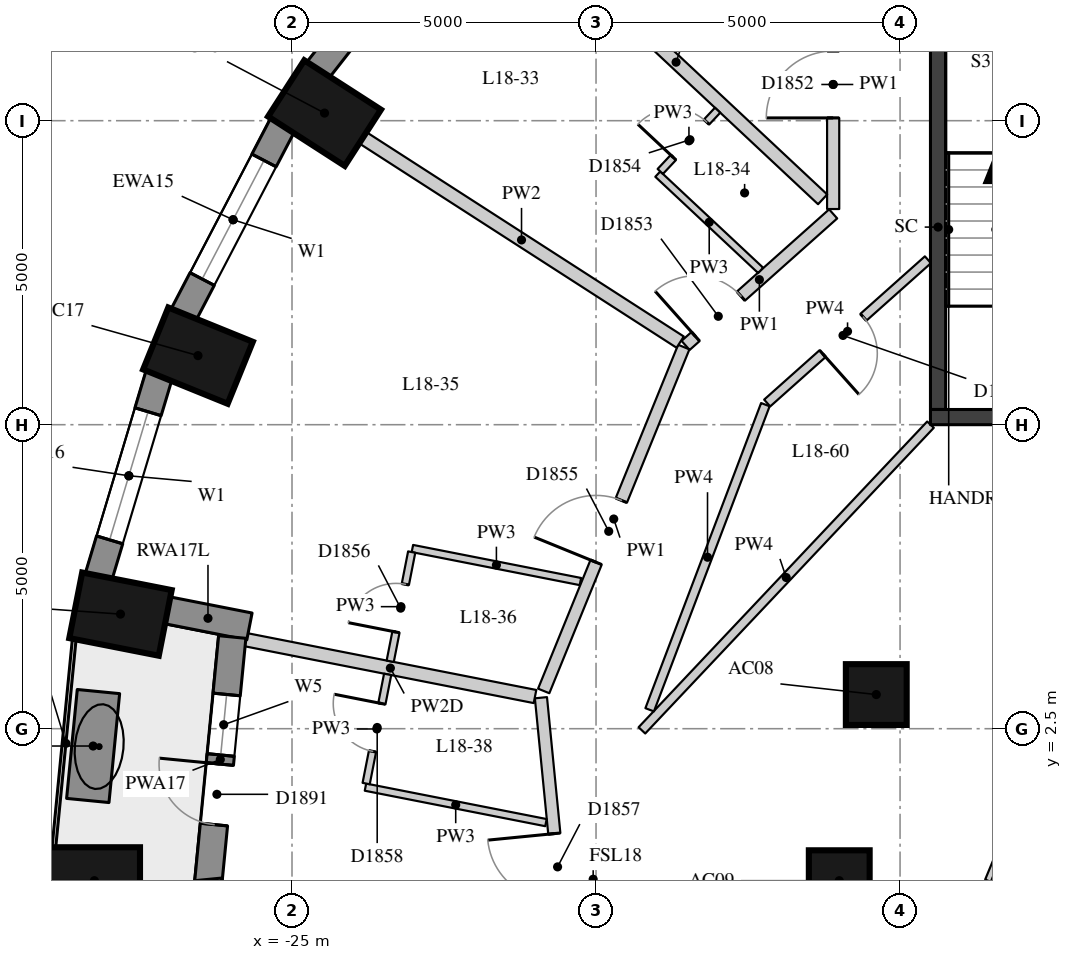
"""IFC4 building model, lengths in metres.
Left out: names, types, materials, properties, quantities, classifications, styles, units other than length and angle.
Written with IfcOpenShell. Run it as: python <this file> out.ifc"""

import sys

from ifc_helpers import new_model, si_unit, direction, frame, frame_2d, origin, origin_2d, place, context, subcontext, project, spatial, rectangle, extrude, element, fill, save


model = new_model("IFC4")
c1 = context("Model", 3, precision=1e-05, world=origin(), true_north=direction((0.0, 1.0)))
c2 = subcontext(c1, "Body", "Model", "MODEL_VIEW")
j1 = project(units=[si_unit("LENGTHUNIT", "METRE"), si_unit("PLANEANGLEUNIT", "RADIAN")], contexts=[c1])
p1 = place(None, origin())
s1 = spatial("IfcSite", under=j1, at=p1, CompositionType="ELEMENT")
p2 = place(p1, origin())
s2 = spatial("IfcBuilding", under=s1, at=p2, CompositionType="ELEMENT")
p3 = place(p2, frame((0.0, 0.0, 67.9)))
s3 = spatial("IfcBuildingStorey", under=s2, at=p3, CompositionType="ELEMENT", Elevation=67.9)
for number, where, z_axis, x_axis in (
    (1, (-24.465, 12.625, 0.0), (0.0, 0.0, 1.0), (-0.841, 0.541, 0.0)),
    (2, (-26.546, 8.636, 0.0), (0.0, 0.0, 1.0), (-0.927, 0.376, 0.0)),
    (3, (-27.821, 4.385, 0.0), (0.0, 0.0, 1.0), (-0.981, 0.193, 0.0)),
    (4, (-28.25, 0.0, 0.0), (0.0, 0.0, 1.0), (-1.0, 0.0, 0.0)),
):
    element("IfcColumn", number, at=place(p3, frame(where, z_axis=z_axis, x_axis=x_axis)), inside=s3, PredefinedType="COLUMN", context=c2, shape_type="SweptSolid", body=[
        extrude(rectangle(XDim=1.5, YDim=1.1, at=origin_2d()), origin(), (0.0, 0.0, 1.0), 3.3),
    ])
for number, where, z_axis, x_axis in (
    (5, (-15.391, 3.062, 0.0), (0.0, 0.0, 1.0), (1.0, 0.0, 0.0)),
    (6, (-16.0, 0.0, 0.0), (0.0, 0.0, 1.0), (1.0, 0.0, 0.0)),
):
    element("IfcColumn", number, at=place(p3, frame(where, z_axis=z_axis, x_axis=x_axis)), inside=s3, PredefinedType="COLUMN", context=c2, shape_type="SweptSolid", body=[
        extrude(rectangle(XDim=1.0, YDim=1.0, at=origin_2d()), origin(), (0.0, 0.0, 1.0), 3.3),
    ])
p4 = place(p3, frame((-22.352, 16.17, 0.0), z_axis=(0.0, 0.0, 1.0), x_axis=(-0.616661975264, -0.787228053529, 0.0)))
e7 = element("IfcWall", 7, at=p4, inside=s3, PredefinedType="SOLIDWALL", context=c2, shape_type="SweptSolid", body=[
    extrude(rectangle(XDim=3.61, YDim=0.45, at=frame_2d((1.805, 0.0))), origin(), (0.0, 0.0, 1.0), 3.02),
])
p5 = place(p4, frame((0.705, 0.0, 0.4)))
e8 = element("IfcOpeningElement", 8, at=p5, cuts=e7, PredefinedType="OPENING", context=c2, shape_type="SweptSolid", body=[
    extrude(rectangle(XDim=2.2, YDim=1.75, at=frame_2d((1.1, 0.875))), frame((0.0, 0.235, 0.0), z_axis=(0.0, -1.0, 0.0), x_axis=(1.0, 0.0, 0.0)), (0.0, 0.0, 1.0), 0.47),
])
p6 = place(p3, frame((-25.152, 12.437, 0.0), z_axis=(0.0, 0.0, 1.0), x_axis=(-0.462492775226, -0.886623050041, 0.0)))
e9 = element("IfcWall", 9, at=p6, inside=s3, PredefinedType="SOLIDWALL", context=c2, shape_type="SweptSolid", body=[
    extrude(rectangle(XDim=3.532, YDim=0.45, at=frame_2d((1.766, 0.0))), origin(), (0.0, 0.0, 1.0), 3.02),
])
p7 = place(p6, frame((0.666, 0.0, 0.4)))
e10 = element("IfcOpeningElement", 10, at=p7, cuts=e9, PredefinedType="OPENING", context=c2, shape_type="SweptSolid", body=[
    extrude(rectangle(XDim=2.2, YDim=1.75, at=frame_2d((1.1, 0.875))), frame((0.0, 0.235, 0.0), z_axis=(0.0, -1.0, 0.0), x_axis=(1.0, 0.0, 0.0)), (0.0, 0.0, 1.0), 0.47),
])
p8 = place(p3, frame((-27.185, 8.323, 0.0), z_axis=(0.0, 0.0, 1.0), x_axis=(-0.287064133733, -0.957911364963, 0.0)))
e11 = element("IfcWall", 11, at=p8, inside=s3, PredefinedType="SOLIDWALL", context=c2, shape_type="SweptSolid", body=[
    extrude(rectangle(XDim=3.473, YDim=0.45, at=frame_2d((1.737, 0.0))), origin(), (0.0, 0.0, 1.0), 3.02),
])
p9 = place(p8, frame((0.637, 0.0, 0.4)))
e12 = element("IfcOpeningElement", 12, at=p9, cuts=e11, PredefinedType="OPENING", context=c2, shape_type="SweptSolid", body=[
    extrude(rectangle(XDim=2.2, YDim=1.75, at=frame_2d((1.1, 0.875))), frame((0.0, 0.235, 0.0), z_axis=(0.0, -1.0, 0.0), x_axis=(1.0, 0.0, 0.0)), (0.0, 0.0, 1.0), 0.47),
])
p10 = place(p3, frame((-27.064, 4.45, 0.0), z_axis=(0.0, 0.0, 1.0), x_axis=(0.98123042829, -0.192838913596, 0.0)))
e13 = element("IfcWall", 13, at=p10, inside=s3, PredefinedType="SOLIDWALL", context=c2, shape_type="SweptSolid", body=[
    extrude(rectangle(XDim=1.39, YDim=0.45, at=frame_2d((0.695, 0.0))), origin(), (0.0, 0.0, 1.0), 2.47),
])
p11 = place(p3, frame((-25.983, 4.008, 0.0), z_axis=(0.0, 0.0, 1.0), x_axis=(-0.097133468736, -0.995271364629, 0.0)))
e14 = element("IfcWall", 14, at=p11, inside=s3, PredefinedType="SOLIDWALL", context=c2, shape_type="SweptSolid", body=[
    extrude(rectangle(XDim=4.049, YDim=0.45, at=frame_2d((2.024, 0.0))), origin(), (0.0, 0.0, 1.0), 3.02),
])
p12 = place(p11, frame((0.949, 0.0, 0.4)))
e15 = element("IfcOpeningElement", 15, at=p12, cuts=e14, PredefinedType="OPENING", context=c2, shape_type="SweptSolid", body=[
    extrude(rectangle(XDim=1.0, YDim=1.75, at=frame_2d((0.5, 0.875))), frame((0.0, 0.235, 0.0), z_axis=(0.0, -1.0, 0.0), x_axis=(1.0, 0.0, 0.0)), (0.0, 0.0, 1.0), 0.47),
])
p13 = place(p11, frame((2.1, 0.0, 0.0)))
e16 = element("IfcOpeningElement", 16, at=p13, cuts=e14, PredefinedType="OPENING", context=c2, shape_type="SweptSolid", body=[
    extrude(rectangle(XDim=1.0, YDim=2.15, at=frame_2d((0.5, 1.075))), frame((0.0, 0.235, 0.0), z_axis=(0.0, -1.0, 0.0), x_axis=(1.0, 0.0, 0.0)), (0.0, 0.0, 1.0), 0.47),
])
p14 = place(p3, frame((-26.376, 0.022, 0.0), z_axis=(0.0, 0.0, 1.0), x_axis=(0.097092719726, -0.995275340685, 0.0)))
e17 = element("IfcWall", 17, at=p14, inside=s3, PredefinedType="SOLIDWALL", context=c2, shape_type="SweptSolid", body=[
    extrude(rectangle(XDim=4.071, YDim=0.45, at=frame_2d((2.036, 0.0))), origin(), (0.0, 0.0, 1.0), 3.02),
])
p15 = place(p14, frame((0.96, 0.0, 0.4)))
e18 = element("IfcOpeningElement", 18, at=p15, cuts=e17, PredefinedType="OPENING", context=c2, shape_type="SweptSolid", body=[
    extrude(rectangle(XDim=1.0, YDim=1.75, at=frame_2d((0.5, 0.875))), frame((0.0, 0.235, 0.0), z_axis=(0.0, -1.0, 0.0), x_axis=(1.0, 0.0, 0.0)), (0.0, 0.0, 1.0), 0.47),
])
p16 = place(p14, frame((2.111, 0.0, 0.0)))
e19 = element("IfcOpeningElement", 19, at=p16, cuts=e17, PredefinedType="OPENING", context=c2, shape_type="SweptSolid", body=[
    extrude(rectangle(XDim=1.0, YDim=2.15, at=frame_2d((0.5, 1.075))), frame((0.0, 0.235, 0.0), z_axis=(0.0, -1.0, 0.0), x_axis=(1.0, 0.0, 0.0)), (0.0, 0.0, 1.0), 0.47),
])
p17 = place(p3, frame((-28.183, 3.111, 0.0), z_axis=(0.0, 0.0, 1.0), x_axis=(-0.097381768628, -0.995247100543, 0.0)))
e20 = element("IfcWall", 20, at=p17, inside=s3, PredefinedType="USERDEFINED", context=c2, shape_type="SweptSolid", body=[
    extrude(rectangle(XDim=1.8, YDim=0.7, at=frame_2d((0.9, 0.0))), origin(), (0.0, 0.0, 1.0), 0.75),
])
p18 = place(p3, frame((-14.375, 7.75, -0.28), z_axis=(0.0, 0.0, 1.0), x_axis=(0.0, 1.0, 0.0)))
e21 = element("IfcWall", 21, at=p18, inside=s3, PredefinedType="SHEAR", context=c2, shape_type="SweptSolid", body=[
    extrude(rectangle(XDim=6.0, YDim=0.25, at=frame_2d((3.0, 0.0))), origin(), (0.0, 0.0, 1.0), 3.3),
])
p19 = place(p3, frame((-14.5, 7.625, -0.28), z_axis=(0.0, 0.0, 1.0), x_axis=(1.0, 0.0, 0.0)))
e22 = element("IfcWall", 22, at=p19, inside=s3, PredefinedType="SHEAR", context=c2, shape_type="SweptSolid", body=[
    extrude(rectangle(XDim=5.2, YDim=0.25, at=frame_2d((2.6, 0.0))), origin(), (0.0, 0.0, 1.0), 3.3),
])
p20 = place(p3, frame((-20.034, -5.858, 0.0), z_axis=(0.0, 0.0, 1.0), x_axis=(-0.097894942705, 0.995196754513, 0.0)))
e23 = element("IfcWall", 23, at=p20, inside=s3, PredefinedType="PARTITIONING", context=c2, shape_type="SweptSolid", body=[
    extrude(rectangle(XDim=8.911, YDim=0.2, at=frame_2d((4.455, 0.0))), origin(), (0.0, 0.0, 1.0), 3.02),
])
p21 = place(p20, frame((5.565, 0.0, 0.0)))
e24 = element("IfcOpeningElement", 24, at=p21, cuts=e23, PredefinedType="OPENING", context=c2, shape_type="SweptSolid", body=[
    extrude(rectangle(XDim=1.1, YDim=2.1, at=frame_2d((0.55, 1.05))), frame((0.0, 0.11, 0.0), z_axis=(0.0, -1.0, 0.0), x_axis=(1.0, 0.0, 0.0)), (0.0, 0.0, 1.0), 0.22),
])
p22 = place(p20, frame((1.044, 0.0, 0.0)))
e25 = element("IfcOpeningElement", 25, at=p22, cuts=e23, PredefinedType="OPENING", context=c2, shape_type="SweptSolid", body=[
    extrude(rectangle(XDim=0.9, YDim=2.1, at=frame_2d((0.45, 1.05))), frame((0.0, 0.11, 0.0), z_axis=(0.0, -1.0, 0.0), x_axis=(1.0, 0.0, 0.0)), (0.0, 0.0, 1.0), 0.22),
])
p23 = place(p3, frame((-20.861, 3.121, 0.0), z_axis=(0.0, 0.0, 1.0), x_axis=(0.377214346955, 0.926125983034, 0.0)))
e26 = element("IfcWall", 26, at=p23, inside=s3, PredefinedType="PARTITIONING", context=c2, shape_type="SweptSolid", body=[
    extrude(rectangle(XDim=6.107, YDim=0.2, at=frame_2d((3.054, 0.0))), origin(), (0.0, 0.0, 1.0), 3.02),
])
p24 = place(p23, frame((2.285, 0.0, 0.0)))
e27 = element("IfcOpeningElement", 27, at=p24, cuts=e26, PredefinedType="OPENING", context=c2, shape_type="SweptSolid", body=[
    extrude(rectangle(XDim=1.1, YDim=2.1, at=frame_2d((0.55, 1.05))), frame((0.0, 0.11, 0.0), z_axis=(0.0, -1.0, 0.0), x_axis=(1.0, 0.0, 0.0)), (0.0, 0.0, 1.0), 0.22),
])
p25 = place(p3, frame((-18.527, 8.804, 0.0), z_axis=(0.0, 0.0, 1.0), x_axis=(0.746493000154, 0.665393267716, 0.0)))
e28 = element("IfcWall", 28, at=p25, inside=s3, PredefinedType="PARTITIONING", context=c2, shape_type="SweptSolid", body=[
    extrude(rectangle(XDim=3.251, YDim=0.2, at=frame_2d((1.625, 0.0))), origin(), (0.0, 0.0, 1.0), 3.02),
])
p26 = place(p25, frame((0.22, 0.0, 0.0)))
e29 = element("IfcOpeningElement", 29, at=p26, cuts=e28, PredefinedType="OPENING", context=c2, shape_type="SweptSolid", body=[
    extrude(rectangle(XDim=1.0, YDim=2.1, at=frame_2d((0.5, 1.05))), frame((0.0, 0.11, 0.0), z_axis=(0.0, -1.0, 0.0), x_axis=(1.0, 0.0, 0.0)), (0.0, 0.0, 1.0), 0.22),
])
p27 = place(p3, frame((-16.1, 11.047, 0.0), z_axis=(0.0, 0.0, 1.0), x_axis=(0.0, 1.0, 0.0)))
e30 = element("IfcWall", 30, at=p27, inside=s3, PredefinedType="PARTITIONING", context=c2, shape_type="SweptSolid", body=[
    extrude(rectangle(XDim=4.097, YDim=0.2, at=frame_2d((2.048, 0.0))), origin(), (0.0, 0.0, 1.0), 3.02),
])
p28 = place(p27, frame((1.499, 0.0, 0.0)))
e31 = element("IfcOpeningElement", 31, at=p28, cuts=e30, PredefinedType="OPENING", context=c2, shape_type="SweptSolid", body=[
    extrude(rectangle(XDim=1.1, YDim=2.1, at=frame_2d((0.55, 1.05))), frame((0.0, 0.11, 0.0), z_axis=(0.0, -1.0, 0.0), x_axis=(1.0, 0.0, 0.0)), (0.0, 0.0, 1.0), 0.22),
])
p29 = place(p3, frame((-14.499, 7.501, 0.0), z_axis=(0.0, 0.0, 1.0), x_axis=(-0.686403699782, -0.727220709913, 0.0)))
e32 = element("IfcWall", 32, at=p29, inside=s3, PredefinedType="PARTITIONING", context=c2, shape_type="SweptSolid", body=[
    extrude(rectangle(XDim=6.915, YDim=0.15, at=frame_2d((3.457, 0.0))), origin(), (0.0, 0.0, 1.0), 3.02),
])
p30 = place(p3, frame((-19.118, 2.811, 0.0), z_axis=(0.0, 0.0, 1.0), x_axis=(0.35451573991, 0.935050046872, 0.0)))
e33 = element("IfcWall", 33, at=p30, inside=s3, PredefinedType="PARTITIONING", context=c2, shape_type="SweptSolid", body=[
    extrude(rectangle(XDim=5.367, YDim=0.15, at=frame_2d((2.684, 0.0))), origin(), (0.0, 0.0, 1.0), 3.02),
])
p31 = place(p3, frame((-17.185, 7.856, 0.0), z_axis=(0.0, 0.0, 1.0), x_axis=(0.746480516634, 0.665407272493, 0.0)))
e34 = element("IfcWall", 34, at=p31, inside=s3, PredefinedType="PARTITIONING", context=c2, shape_type="SweptSolid", body=[
    extrude(rectangle(XDim=3.541, YDim=0.15, at=frame_2d((1.771, 0.0))), origin(), (0.0, 0.0, 1.0), 3.02),
])
p32 = place(p31, frame((1.221, 0.0, 0.0)))
e35 = element("IfcOpeningElement", 35, at=p32, cuts=e34, PredefinedType="OPENING", context=c2, shape_type="SweptSolid", body=[
    extrude(rectangle(XDim=0.9, YDim=2.1, at=frame_2d((0.45, 1.05))), frame((0.0, 0.085, 0.0), z_axis=(0.0, -1.0, 0.0), x_axis=(1.0, 0.0, 0.0)), (0.0, 0.0, 1.0), 0.17),
])
p33 = place(p3, frame((-21.093, 15.718, 0.0), z_axis=(0.0, 0.0, 1.0), x_axis=(0.73009284205, -0.683347965525, 0.0)))
e36 = element("IfcWall", 36, at=p33, inside=s3, PredefinedType="PARTITIONING", context=c2, shape_type="SweptSolid", body=[
    extrude(rectangle(XDim=6.602, YDim=0.22, at=frame_2d((3.301, 0.0))), origin(), (0.0, 0.0, 1.0), 3.02),
])
p34 = place(p3, frame((-23.835, 12.219, 0.0), z_axis=(0.0, 0.0, 1.0), x_axis=(0.840743714791, -0.541433288633, 0.0)))
e37 = element("IfcWall", 37, at=p34, inside=s3, PredefinedType="PARTITIONING", context=c2, shape_type="SweptSolid", body=[
    extrude(rectangle(XDim=6.207, YDim=0.22, at=frame_2d((3.104, 0.0))), origin(), (0.0, 0.0, 1.0), 3.02),
])
p35 = place(p3, frame((-25.761, 3.964, 0.0), z_axis=(0.0, 0.0, 1.0), x_axis=(0.981216494224, -0.192909801364, 0.0)))
e38 = element("IfcWall", 38, at=p35, inside=s3, PredefinedType="PARTITIONING", context=c2, shape_type="SweptSolid", body=[
    extrude(rectangle(XDim=4.848, YDim=0.22, at=frame_2d((2.424, 0.0))), origin(), (0.0, 0.0, 1.0), 2.47),
])
p36 = place(p3, frame((-17.293, 10.038, 0.0), z_axis=(0.0, 0.0, 1.0), x_axis=(-0.730059424734, 0.683383667026, 0.0)))
e39 = element("IfcWall", 39, at=p36, inside=s3, PredefinedType="PARTITIONING", context=c2, shape_type="SweptSolid", body=[
    extrude(rectangle(XDim=2.317, YDim=0.12, at=frame_2d((1.159, 0.0))), origin(), (0.0, 0.0, 1.0), 3.02),
])
p37 = place(p3, frame((-20.257, 4.92, 0.0), z_axis=(0.0, 0.0, 1.0), x_axis=(-0.981202530622, 0.192980812261, 0.0)))
e40 = element("IfcWall", 40, at=p37, inside=s3, PredefinedType="PARTITIONING", context=c2, shape_type="SweptSolid", body=[
    extrude(rectangle(XDim=2.816, YDim=0.12, at=frame_2d((1.408, 0.0))), origin(), (0.0, 0.0, 1.0), 3.02),
])
p38 = place(p3, frame((-20.823, 0.955, 0.0), z_axis=(0.0, 0.0, 1.0), x_axis=(-0.981208735185, 0.192949262754, 0.0)))
e41 = element("IfcWall", 41, at=p38, inside=s3, PredefinedType="PARTITIONING", context=c2, shape_type="SweptSolid", body=[
    extrude(rectangle(XDim=3.025, YDim=0.12, at=frame_2d((1.513, 0.0))), origin(), (0.0, 0.0, 1.0), 3.02),
])
p39 = place(p3, frame((-18.943, 11.665, 0.0), z_axis=(0.0, 0.0, 1.0), x_axis=(0.683364094355, 0.730077745549, 0.0)))
e42 = element("IfcWall", 42, at=p39, inside=s3, PredefinedType="PARTITIONING", context=c2, shape_type="SweptSolid", body=[
    extrude(rectangle(XDim=1.38, YDim=0.12, at=frame_2d((0.69, 0.0))), origin(), (0.0, 0.0, 1.0), 3.02),
])
p40 = place(p39, frame((0.315, 0.0, 0.0)))
e43 = element("IfcOpeningElement", 43, at=p40, cuts=e42, PredefinedType="OPENING", context=c2, shape_type="SweptSolid", body=[
    extrude(rectangle(XDim=0.8, YDim=2.1, at=frame_2d((0.4, 1.05))), frame((0.0, 0.07, 0.0), z_axis=(0.0, -1.0, 0.0), x_axis=(1.0, 0.0, 0.0)), (0.0, 0.0, 1.0), 0.14),
])
p41 = place(p3, frame((-23.032, 5.405, 0.0), z_axis=(0.0, 0.0, 1.0), x_axis=(-0.19288291118, -0.981221780524, 0.0)))
e44 = element("IfcWall", 44, at=p41, inside=s3, PredefinedType="PARTITIONING", context=c2, shape_type="SweptSolid", body=[
    extrude(rectangle(XDim=1.83, YDim=0.12, at=frame_2d((0.915, 0.0))), origin(), (0.0, 0.0, 1.0), 3.02),
])
p42 = place(p41, frame((0.54, 0.0, 0.0)))
e45 = element("IfcOpeningElement", 45, at=p42, cuts=e44, PredefinedType="OPENING", context=c2, shape_type="SweptSolid", body=[
    extrude(rectangle(XDim=0.8, YDim=2.1, at=frame_2d((0.4, 1.05))), frame((0.0, 0.07, 0.0), z_axis=(0.0, -1.0, 0.0), x_axis=(1.0, 0.0, 0.0)), (0.0, 0.0, 1.0), 0.14),
])
p43 = place(p3, frame((-23.781, 1.598, 0.0), z_axis=(0.0, 0.0, 1.0), x_axis=(0.193036598643, 0.981191557029, 0.0)))
e46 = element("IfcWall", 46, at=p43, inside=s3, PredefinedType="PARTITIONING", context=c2, shape_type="SweptSolid", body=[
    extrude(rectangle(XDim=1.83, YDim=0.12, at=frame_2d((0.915, 0.0))), origin(), (0.0, 0.0, 1.0), 3.02),
])
p44 = place(p43, frame((0.54, 0.0, 0.0)))
e47 = element("IfcOpeningElement", 47, at=p44, cuts=e46, PredefinedType="OPENING", context=c2, shape_type="SweptSolid", body=[
    extrude(rectangle(XDim=0.8, YDim=2.1, at=frame_2d((0.4, 1.05))), frame((0.0, 0.07, 0.0), z_axis=(0.0, -1.0, 0.0), x_axis=(1.0, 0.0, 0.0)), (0.0, 0.0, 1.0), 0.14),
])
for number, where, z_axis, x_axis in (
    (48, (-11.927, -3.927, 0.0), (0.0, 0.0, 1.0), (-0.383, 0.924, 0.0)),
    (49, (-13.554, 0.0, 0.0), (0.0, 0.0, 1.0), (0.383, 0.924, 0.0)),
):
    element("IfcWall", number, at=place(p3, frame(where, z_axis=z_axis, x_axis=x_axis)), inside=s3, PredefinedType="PARTITIONING", context=c2, shape_type="SweptSolid", body=[
        extrude(rectangle(XDim=4.251, YDim=0.1, at=frame_2d((2.125, 0.0))), origin(), (0.0, 0.0, 1.0), 3.02),
    ])
p45 = place(p7, origin())
e50 = element("IfcWindow", 50, at=p45, inside=s3, PartitioningType="SINGLE_PANEL", PredefinedType="WINDOW", context=c2, shape_type="SweptSolid", body=[
    extrude(rectangle(XDim=2.2, YDim=1.75, at=frame_2d((1.1, 0.875))), frame((0.0, 0.035, 0.0), z_axis=(0.0, -1.0, 0.0), x_axis=(1.0, 0.0, 0.0)), (0.0, 0.0, 1.0), 0.06),
])
fill(e10, e50)
p46 = place(p9, origin())
e51 = element("IfcWindow", 51, at=p46, inside=s3, PartitioningType="SINGLE_PANEL", PredefinedType="WINDOW", context=c2, shape_type="SweptSolid", body=[
    extrude(rectangle(XDim=2.2, YDim=1.75, at=frame_2d((1.1, 0.875))), frame((0.0, 0.035, 0.0), z_axis=(0.0, -1.0, 0.0), x_axis=(1.0, 0.0, 0.0)), (0.0, 0.0, 1.0), 0.06),
])
fill(e12, e51)
p47 = place(p12, origin())
e52 = element("IfcWindow", 52, at=p47, inside=s3, PartitioningType="SINGLE_PANEL", PredefinedType="WINDOW", context=c2, shape_type="SweptSolid", body=[
    extrude(rectangle(XDim=1.0, YDim=1.75, at=frame_2d((0.5, 0.875))), frame((0.0, 0.035, 0.0), z_axis=(0.0, -1.0, 0.0), x_axis=(1.0, 0.0, 0.0)), (0.0, 0.0, 1.0), 0.06),
])
fill(e15, e52)
p48 = place(p13, frame((1.0, 0.0, 0.0), z_axis=(0.0, 0.0, 1.0), x_axis=(-1.0, 0.0, 0.0)))
e53 = element("IfcDoor", 53, at=p48, inside=s3, OperationType="SINGLE_SWING_RIGHT", PredefinedType="DOOR", context=c2, shape_type="SweptSolid", body=[
    extrude(rectangle(XDim=1.0, YDim=2.15, at=frame_2d((0.5, 1.075))), frame((0.0, 0.075, 0.0), z_axis=(0.0, -1.0, 0.0), x_axis=(1.0, 0.0, 0.0)), (0.0, 0.0, 1.0), 0.05),
])
fill(e16, e53)
p49 = place(p28, origin())
e54 = element("IfcDoor", 54, at=p49, inside=s3, OperationType="SINGLE_SWING_LEFT", PredefinedType="DOOR", context=c2, shape_type="SweptSolid", body=[
    extrude(rectangle(XDim=1.1, YDim=2.1, at=frame_2d((0.55, 1.05))), frame((0.0, 0.025, 0.0), z_axis=(0.0, -1.0, 0.0), x_axis=(1.0, 0.0, 0.0)), (0.0, 0.0, 1.0), 0.05),
])
fill(e31, e54)
p50 = place(p26, origin())
e55 = element("IfcDoor", 55, at=p50, inside=s3, OperationType="SINGLE_SWING_LEFT", PredefinedType="DOOR", context=c2, shape_type="SweptSolid", body=[
    extrude(rectangle(XDim=1.0, YDim=2.1, at=frame_2d((0.5, 1.05))), frame((0.0, 0.025, 0.0), z_axis=(0.0, -1.0, 0.0), x_axis=(1.0, 0.0, 0.0)), (0.0, 0.0, 1.0), 0.05),
])
fill(e29, e55)
p51 = place(p40, origin())
e56 = element("IfcDoor", 56, at=p51, inside=s3, OperationType="SINGLE_SWING_LEFT", PredefinedType="DOOR", context=c2, shape_type="SweptSolid", body=[
    extrude(rectangle(XDim=0.8, YDim=2.1, at=frame_2d((0.4, 1.05))), frame((0.0, 0.025, 0.0), z_axis=(0.0, -1.0, 0.0), x_axis=(1.0, 0.0, 0.0)), (0.0, 0.0, 1.0), 0.05),
])
fill(e43, e56)
p52 = place(p24, origin())
e57 = element("IfcDoor", 57, at=p52, inside=s3, OperationType="SINGLE_SWING_LEFT", PredefinedType="DOOR", context=c2, shape_type="SweptSolid", body=[
    extrude(rectangle(XDim=1.1, YDim=2.1, at=frame_2d((0.55, 1.05))), frame((0.0, 0.025, 0.0), z_axis=(0.0, -1.0, 0.0), x_axis=(1.0, 0.0, 0.0)), (0.0, 0.0, 1.0), 0.05),
])
fill(e27, e57)
p53 = place(p42, origin())
e58 = element("IfcDoor", 58, at=p53, inside=s3, OperationType="SINGLE_SWING_LEFT", PredefinedType="DOOR", context=c2, shape_type="SweptSolid", body=[
    extrude(rectangle(XDim=0.8, YDim=2.1, at=frame_2d((0.4, 1.05))), frame((0.0, 0.025, 0.0), z_axis=(0.0, -1.0, 0.0), x_axis=(1.0, 0.0, 0.0)), (0.0, 0.0, 1.0), 0.05),
])
fill(e45, e58)
p54 = place(p21, origin())
e59 = element("IfcDoor", 59, at=p54, inside=s3, OperationType="SINGLE_SWING_RIGHT", PredefinedType="DOOR", context=c2, shape_type="SweptSolid", body=[
    extrude(rectangle(XDim=1.1, YDim=2.1, at=frame_2d((0.55, 1.05))), frame((0.0, 0.025, 0.0), z_axis=(0.0, -1.0, 0.0), x_axis=(1.0, 0.0, 0.0)), (0.0, 0.0, 1.0), 0.05),
])
fill(e24, e59)
p55 = place(p44, origin())
e60 = element("IfcDoor", 60, at=p55, inside=s3, OperationType="SINGLE_SWING_RIGHT", PredefinedType="DOOR", context=c2, shape_type="SweptSolid", body=[
    extrude(rectangle(XDim=0.8, YDim=2.1, at=frame_2d((0.4, 1.05))), frame((0.0, 0.025, 0.0), z_axis=(0.0, -1.0, 0.0), x_axis=(1.0, 0.0, 0.0)), (0.0, 0.0, 1.0), 0.05),
])
fill(e47, e60)
p56 = place(p32, origin())
e61 = element("IfcDoor", 61, at=p56, inside=s3, OperationType="SINGLE_SWING_RIGHT", PredefinedType="DOOR", context=c2, shape_type="SweptSolid", body=[
    extrude(rectangle(XDim=0.9, YDim=2.1, at=frame_2d((0.45, 1.05))), frame((0.0, 0.025, 0.0), z_axis=(0.0, -1.0, 0.0), x_axis=(1.0, 0.0, 0.0)), (0.0, 0.0, 1.0), 0.05),
])
fill(e35, e61)
save(model, sys.argv[1])
